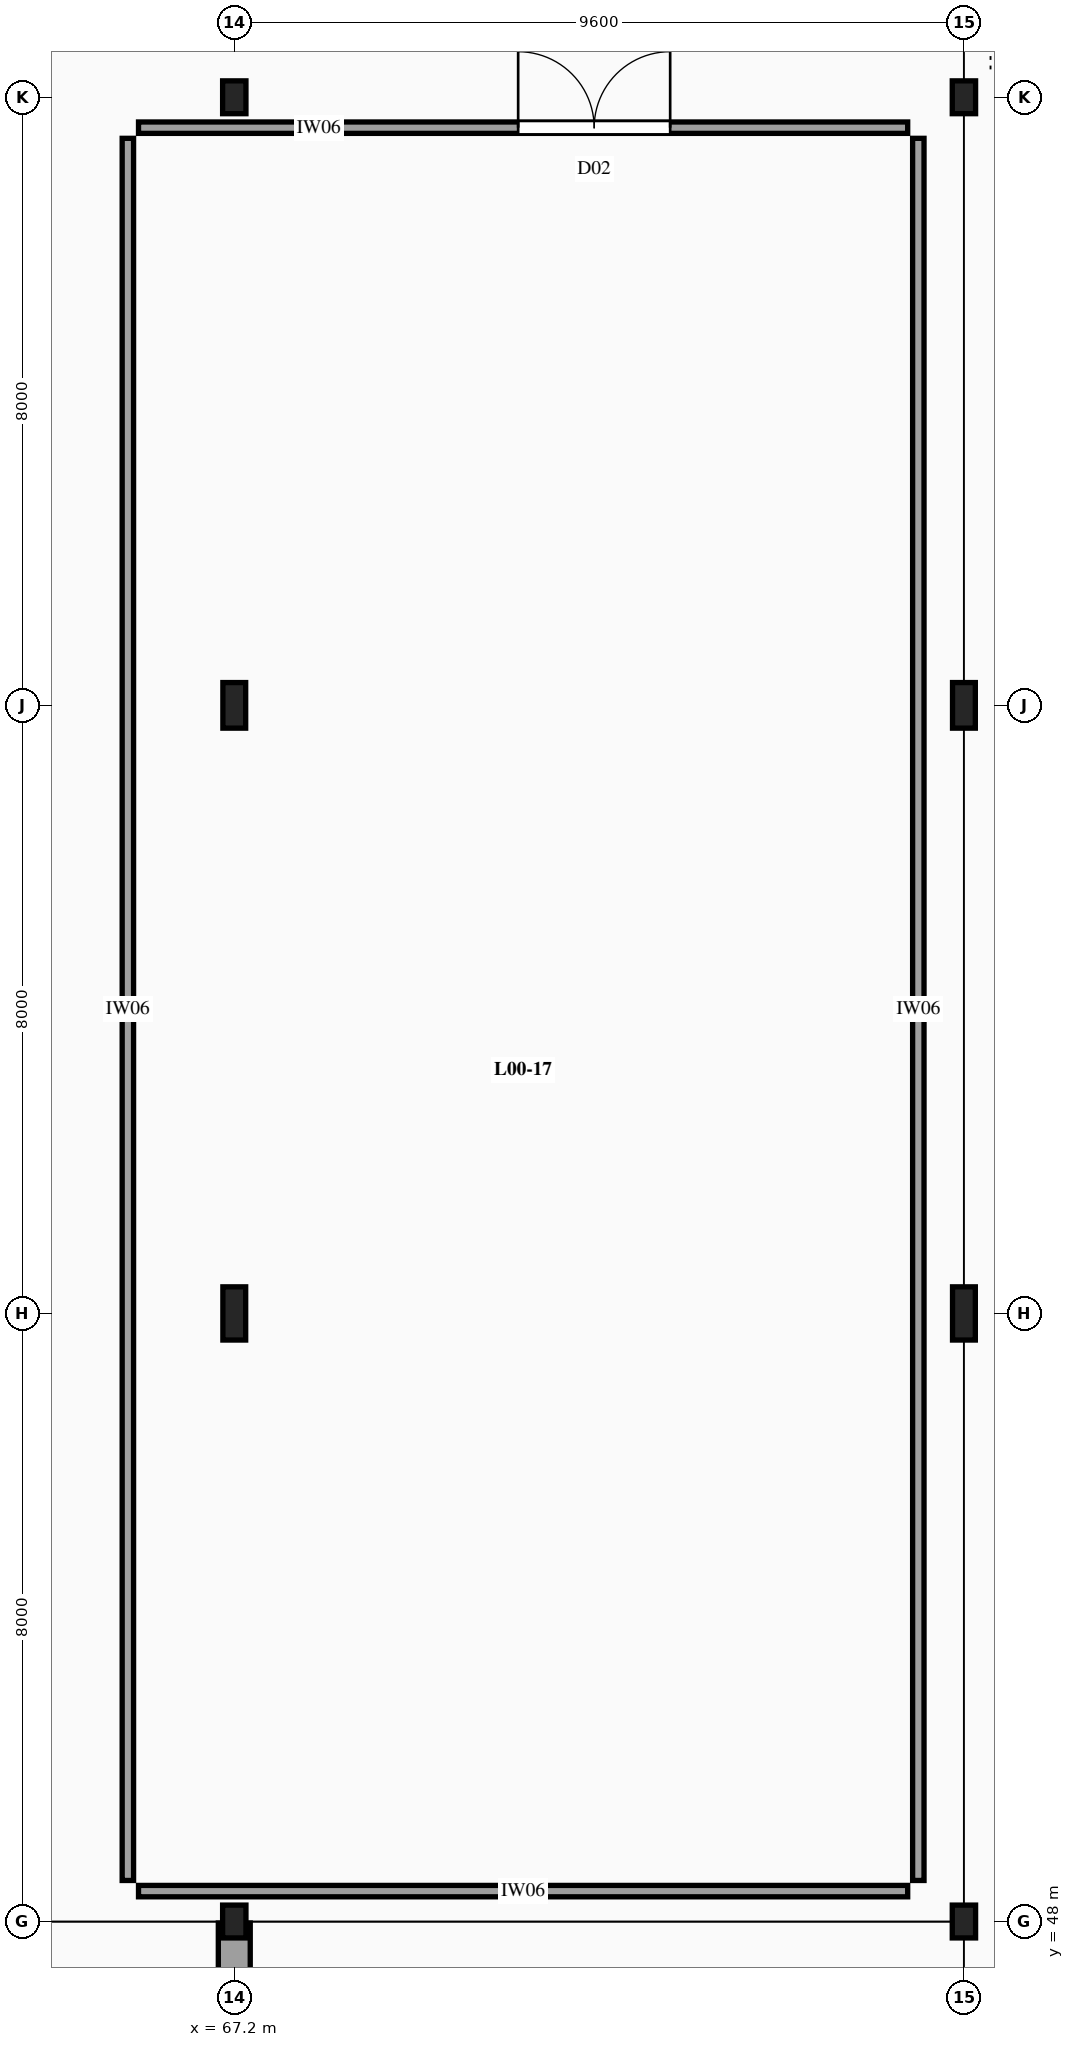
"""IFC4 building model, lengths in metres.
Left out: names, types, materials, properties, quantities, classifications, styles, units other than length and angle.
Written with IfcOpenShell. Run it as: python <this file> out.ifc"""

import sys

from ifc_helpers import new_model, si_unit, direction, frame, frame_2d, origin, origin_2d, place, context, subcontext, project, spatial, rectangle, i_section, extrude, element, fill, save


model = new_model("IFC4")
c1 = context("Model", 3, precision=1e-05, world=origin(), true_north=direction((0.0, 1.0)))
c2 = subcontext(c1, "Body", "Model", "MODEL_VIEW")
j1 = project(units=[si_unit("LENGTHUNIT", "METRE"), si_unit("PLANEANGLEUNIT", "RADIAN")], contexts=[c1])
p1 = place(None, origin())
s1 = spatial("IfcSite", under=j1, at=p1, CompositionType="ELEMENT")
p2 = place(p1, origin())
s2 = spatial("IfcBuilding", under=s1, at=p2, CompositionType="ELEMENT")
p3 = place(p2, origin())
s3 = spatial("IfcBuildingStorey", under=s2, at=p3, CompositionType="ELEMENT", Elevation=0.0)
p4 = place(p3, frame((67.2, 48.0, -0.28), z_axis=(0.0, 0.0, 1.0), x_axis=(1.0, 0.0, 0.0)))
e1 = element("IfcColumn", 1, at=p4, inside=s3, PredefinedType="COLUMN", context=c2, shape_type="SweptSolid", body=[
    extrude(i_section(OverallWidth=0.307, OverallDepth=0.432, WebThickness=0.021, FlangeThickness=0.04, FilletRadius=0.027, at=origin_2d()), origin(), (0.0, 0.0, 1.0), 4.52),
])
p5 = place(p3, frame((67.2, 56.0, -0.28), z_axis=(0.0, 0.0, 1.0), x_axis=(1.0, 0.0, 0.0)))
e2 = element("IfcColumn", 2, at=p5, inside=s3, PredefinedType="COLUMN", context=c2, shape_type="SweptSolid", body=[
    extrude(i_section(OverallWidth=0.3, OverallDepth=0.7, WebThickness=0.017, FlangeThickness=0.032, FilletRadius=0.027, at=origin_2d()), origin(), (0.0, 0.0, 1.0), 4.52),
])
p6 = place(p3, frame((67.2, 64.0, -0.28), z_axis=(0.0, 0.0, 1.0), x_axis=(1.0, 0.0, 0.0)))
e3 = element("IfcColumn", 3, at=p6, inside=s3, PredefinedType="COLUMN", context=c2, shape_type="SweptSolid", body=[
    extrude(i_section(OverallWidth=0.3, OverallDepth=0.6, WebThickness=0.015, FlangeThickness=0.03, FilletRadius=0.027, at=origin_2d()), origin(), (0.0, 0.0, 1.0), 4.52),
])
for number, where, z_axis, x_axis in (
    (4, (67.2, 72.0, -0.28), (0.0, 0.0, 1.0), (1.0, 0.0, 0.0)),
    (5, (76.8, 48.0, -0.28), (0.0, 0.0, 1.0), (1.0, 0.0, 0.0)),
):
    element("IfcColumn", number, at=place(p3, frame(where, z_axis=z_axis, x_axis=x_axis)), inside=s3, PredefinedType="COLUMN", context=c2, shape_type="SweptSolid", body=[
        extrude(i_section(OverallWidth=0.307, OverallDepth=0.432, WebThickness=0.021, FlangeThickness=0.04, FilletRadius=0.027, at=origin_2d()), origin(), (0.0, 0.0, 1.0), 4.52),
    ])
p7 = place(p3, frame((76.8, 56.0, -0.28), z_axis=(0.0, 0.0, 1.0), x_axis=(1.0, 0.0, 0.0)))
e6 = element("IfcColumn", 6, at=p7, inside=s3, PredefinedType="COLUMN", context=c2, shape_type="SweptSolid", body=[
    extrude(i_section(OverallWidth=0.3, OverallDepth=0.7, WebThickness=0.017, FlangeThickness=0.032, FilletRadius=0.027, at=origin_2d()), origin(), (0.0, 0.0, 1.0), 4.52),
])
p8 = place(p3, frame((76.8, 64.0, -0.28), z_axis=(0.0, 0.0, 1.0), x_axis=(1.0, 0.0, 0.0)))
e7 = element("IfcColumn", 7, at=p8, inside=s3, PredefinedType="COLUMN", context=c2, shape_type="SweptSolid", body=[
    extrude(i_section(OverallWidth=0.3, OverallDepth=0.6, WebThickness=0.015, FlangeThickness=0.03, FilletRadius=0.027, at=origin_2d()), origin(), (0.0, 0.0, 1.0), 4.52),
])
p9 = place(p3, frame((76.8, 72.0, -0.28), z_axis=(0.0, 0.0, 1.0), x_axis=(1.0, 0.0, 0.0)))
e8 = element("IfcColumn", 8, at=p9, inside=s3, PredefinedType="COLUMN", context=c2, shape_type="SweptSolid", body=[
    extrude(i_section(OverallWidth=0.307, OverallDepth=0.432, WebThickness=0.021, FlangeThickness=0.04, FilletRadius=0.027, at=origin_2d()), origin(), (0.0, 0.0, 1.0), 4.52),
])
p10 = place(p3, frame((67.2, 40.02, 0.0), z_axis=(0.0, 0.0, 1.0), x_axis=(0.0, 1.0, 0.0)))
e9 = element("IfcWall", 9, at=p10, inside=s3, PredefinedType="SOLIDWALL", context=c2, shape_type="SweptSolid", body=[
    extrude(rectangle(XDim=7.96, YDim=0.42, at=frame_2d((3.98, 0.0))), origin(), (0.0, 0.0, 1.0), 3.56),
])
p11 = place(p10, frame((2.85, 0.0, 0.8)))
e10 = element("IfcOpeningElement", 10, at=p11, cuts=e9, PredefinedType="OPENING", context=c2, shape_type="SweptSolid", body=[
    extrude(rectangle(XDim=1.6, YDim=2.4, at=frame_2d((0.8, 1.2))), frame((0.0, 0.22, 0.0), z_axis=(0.0, -1.0, 0.0), x_axis=(1.0, 0.0, 0.0)), (0.0, 0.0, 1.0), 0.44),
])
p12 = place(p3, frame((65.94, 71.6, 0.0), z_axis=(0.0, 0.0, 1.0), x_axis=(1.0, 0.0, 0.0)))
e11 = element("IfcWall", 11, at=p12, inside=s3, PredefinedType="PARTITIONING", context=c2, shape_type="SweptSolid", body=[
    extrude(rectangle(XDim=10.12, YDim=0.15, at=frame_2d((5.06, 0.0))), origin(), (0.0, 0.0, 1.0), 3.6),
])
p13 = place(p12, frame((4.995, 0.0, 0.0)))
e12 = element("IfcOpeningElement", 12, at=p13, cuts=e11, PredefinedType="OPENING", context=c2, shape_type="SweptSolid", body=[
    extrude(rectangle(XDim=2.0, YDim=2.6, at=frame_2d((1.0, 1.3))), frame((0.0, 0.085, 0.0), z_axis=(0.0, -1.0, 0.0), x_axis=(1.0, 0.0, 0.0)), (0.0, 0.0, 1.0), 0.17),
])
p14 = place(p3, frame((65.94, 48.4, 0.0), z_axis=(0.0, 0.0, 1.0), x_axis=(1.0, 0.0, 0.0)))
e13 = element("IfcWall", 13, at=p14, inside=s3, PredefinedType="PARTITIONING", context=c2, shape_type="SweptSolid", body=[
    extrude(rectangle(XDim=10.12, YDim=0.15, at=frame_2d((5.06, 0.0))), origin(), (0.0, 0.0, 1.0), 3.6),
])
for number, where, z_axis, x_axis in (
    (14, (65.8, 48.54, 0.0), (0.0, 0.0, 1.0), (0.0, 1.0, 0.0)),
    (15, (76.2, 48.54, 0.0), (0.0, 0.0, 1.0), (0.0, 1.0, 0.0)),
):
    element("IfcWall", number, at=place(p3, frame(where, z_axis=z_axis, x_axis=x_axis)), inside=s3, PredefinedType="PARTITIONING", context=c2, shape_type="SweptSolid", body=[
        extrude(rectangle(XDim=22.92, YDim=0.15, at=frame_2d((11.46, 0.0))), origin(), (0.0, 0.0, 1.0), 3.6),
    ])
p15 = place(p13, origin())
e16 = element("IfcDoor", 16, at=p15, inside=s3, OperationType="DOUBLE_DOOR_SINGLE_SWING", PredefinedType="DOOR", context=c2, shape_type="SweptSolid", body=[
    extrude(rectangle(XDim=2.0, YDim=2.6, at=frame_2d((1.0, 1.3))), frame((0.0, 0.025, 0.0), z_axis=(0.0, -1.0, 0.0), x_axis=(1.0, 0.0, 0.0)), (0.0, 0.0, 1.0), 0.05),
])
fill(e12, e16)
save(model, sys.argv[1])
